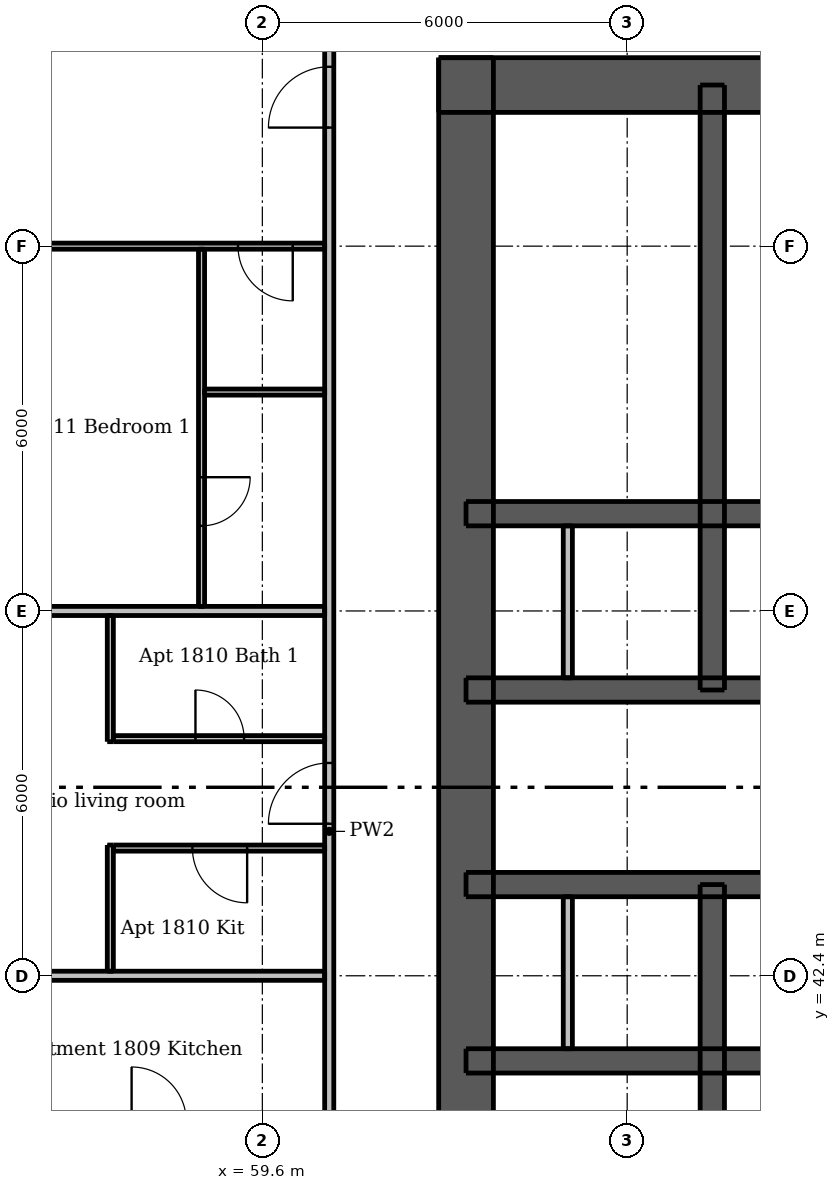
"""IFC4 building model, lengths in metres.
Left out: names, types, materials, properties, quantities, classifications, styles, units other than length and angle.
Written with IfcOpenShell. Run it as: python <this file> out.ifc"""

import sys

from ifc_helpers import new_model, si_unit, direction, frame, frame_2d, origin, place, context, subcontext, project, spatial, rectangle, extrude, element, fill, save


model = new_model("IFC4")
c1 = context("Model", 3, precision=1e-05, world=origin(), true_north=direction((0.0, 1.0)))
c2 = subcontext(c1, "Body", "Model", "MODEL_VIEW")
j1 = project(units=[si_unit("LENGTHUNIT", "METRE"), si_unit("PLANEANGLEUNIT", "RADIAN")], contexts=[c1])
p1 = place(None, origin())
s1 = spatial("IfcSite", under=j1, at=p1, CompositionType="ELEMENT")
p2 = place(p1, origin())
s2 = spatial("IfcBuilding", under=s1, at=p2, CompositionType="ELEMENT")
p3 = place(p2, frame((0.0, 0.0, 66.4)))
s3 = spatial("IfcBuildingStorey", under=s2, at=p3, CompositionType="ELEMENT", Elevation=66.4)
p4 = place(p3, frame((62.5, 57.05, 0.0), z_axis=(0.0, 0.0, 1.0), x_axis=(1.0, 0.0, 0.0)))
e1 = element("IfcWall", 1, at=p4, inside=s3, PredefinedType="SHEAR", context=c2, shape_type="SweptSolid", body=[
    extrude(rectangle(XDim=24.0, YDim=0.9, at=frame_2d((12.0, 0.0))), origin(), (0.0, 0.0, 1.0), 2.95),
])
p5 = place(p4, frame((20.85, 0.0, 0.0)))
e2 = element("IfcOpeningElement", 2, at=p5, cuts=e1, PredefinedType="OPENING", context=c2, shape_type="SweptSolid", body=[
    extrude(rectangle(XDim=1.1, YDim=2.1, at=frame_2d((0.55, 1.05))), frame((0.0, 0.46, 0.0), z_axis=(0.0, -1.0, 0.0), x_axis=(1.0, 0.0, 0.0)), (0.0, 0.0, 1.0), 0.92),
])
p6 = place(p4, frame((2.05, 0.0, 0.0)))
e3 = element("IfcOpeningElement", 3, at=p6, cuts=e1, PredefinedType="OPENING", context=c2, shape_type="SweptSolid", body=[
    extrude(rectangle(XDim=1.1, YDim=2.1, at=frame_2d((0.55, 1.05))), frame((0.0, 0.46, 0.0), z_axis=(0.0, -1.0, 0.0), x_axis=(1.0, 0.0, 0.0)), (0.0, 0.0, 1.0), 0.92),
])
p7 = place(p4, frame((6.44, 0.0, 0.0)))
e4 = element("IfcOpeningElement", 4, at=p7, cuts=e1, PredefinedType="OPENING", context=c2, shape_type="SweptSolid", body=[
    extrude(rectangle(XDim=0.9, YDim=2.1, at=frame_2d((0.45, 1.05))), frame((0.0, 0.46, 0.0), z_axis=(0.0, -1.0, 0.0), x_axis=(1.0, 0.0, 0.0)), (0.0, 0.0, 1.0), 0.92),
])
p8 = place(p4, frame((13.74, 0.0, 0.0)))
e5 = element("IfcOpeningElement", 5, at=p8, cuts=e1, PredefinedType="OPENING", context=c2, shape_type="SweptSolid", body=[
    extrude(rectangle(XDim=0.9, YDim=2.1, at=frame_2d((0.45, 1.05))), frame((0.0, 0.46, 0.0), z_axis=(0.0, -1.0, 0.0), x_axis=(1.0, 0.0, 0.0)), (0.0, 0.0, 1.0), 0.92),
])
p9 = place(p3, frame((62.95, 33.5, 0.0), z_axis=(0.0, 0.0, 1.0), x_axis=(0.0, 1.0, 0.0)))
e6 = element("IfcWall", 6, at=p9, inside=s3, PredefinedType="SHEAR", context=c2, shape_type="SweptSolid", body=[
    extrude(rectangle(XDim=24.0, YDim=0.9, at=frame_2d((12.0, 0.0))), origin(), (0.0, 0.0, 1.0), 2.95),
])
p10 = place(p9, frame((11.2, 0.0, 0.0)))
e7 = element("IfcOpeningElement", 7, at=p10, cuts=e6, PredefinedType="OPENING", context=c2, shape_type="SweptSolid", body=[
    extrude(rectangle(XDim=1.6, YDim=2.1, at=frame_2d((0.8, 1.05))), frame((0.0, 0.46, 0.0), z_axis=(0.0, -1.0, 0.0), x_axis=(1.0, 0.0, 0.0)), (0.0, 0.0, 1.0), 0.92),
])
p11 = place(p3, frame((62.95, 41.0, 0.0), z_axis=(0.0, 0.0, 1.0), x_axis=(1.0, 0.0, 0.0)))
e8 = element("IfcWall", 8, at=p11, inside=s3, PredefinedType="SHEAR", context=c2, shape_type="SweptSolid", body=[
    extrude(rectangle(XDim=23.1, YDim=0.4, at=frame_2d((11.55, 0.0))), origin(), (0.0, 0.0, 1.0), 2.95),
])
p12 = place(p3, frame((62.95, 43.9, 0.0), z_axis=(0.0, 0.0, 1.0), x_axis=(1.0, 0.0, 0.0)))
e9 = element("IfcWall", 9, at=p12, inside=s3, PredefinedType="SHEAR", context=c2, shape_type="SweptSolid", body=[
    extrude(rectangle(XDim=23.1, YDim=0.4, at=frame_2d((11.55, 0.0))), origin(), (0.0, 0.0, 1.0), 2.95),
])
p13 = place(p12, frame((0.662, 0.0, 0.0)))
e10 = element("IfcOpeningElement", 10, at=p13, cuts=e9, PredefinedType="OPENING", context=c2, shape_type="SweptSolid", body=[
    extrude(rectangle(XDim=0.8, YDim=2.1, at=frame_2d((0.4, 1.05))), frame((0.0, 0.21, 0.0), z_axis=(0.0, -1.0, 0.0), x_axis=(1.0, 0.0, 0.0)), (0.0, 0.0, 1.0), 0.42),
])
p14 = place(p12, frame((2.312, 0.0, 0.0)))
e11 = element("IfcOpeningElement", 11, at=p14, cuts=e9, PredefinedType="OPENING", context=c2, shape_type="SweptSolid", body=[
    extrude(rectangle(XDim=0.9, YDim=2.1, at=frame_2d((0.45, 1.05))), frame((0.0, 0.21, 0.0), z_axis=(0.0, -1.0, 0.0), x_axis=(1.0, 0.0, 0.0)), (0.0, 0.0, 1.0), 0.42),
])
p15 = place(p12, frame((20.5, 0.0, 0.0)))
e12 = element("IfcOpeningElement", 12, at=p15, cuts=e9, PredefinedType="OPENING", context=c2, shape_type="SweptSolid", body=[
    extrude(rectangle(XDim=0.9, YDim=2.1, at=frame_2d((0.45, 1.05))), frame((0.0, 0.21, 0.0), z_axis=(0.0, -1.0, 0.0), x_axis=(1.0, 0.0, 0.0)), (0.0, 0.0, 1.0), 0.42),
])
p16 = place(p12, frame((4.75, 0.0, 0.0)))
e13 = element("IfcOpeningElement", 13, at=p16, cuts=e9, PredefinedType="OPENING", context=c2, shape_type="SweptSolid", body=[
    extrude(rectangle(XDim=1.1, YDim=2.1, at=frame_2d((0.55, 1.05))), frame((0.0, 0.21, 0.0), z_axis=(0.0, -1.0, 0.0), x_axis=(1.0, 0.0, 0.0)), (0.0, 0.0, 1.0), 0.42),
])
p17 = place(p12, frame((7.25, 0.0, 0.0)))
e14 = element("IfcOpeningElement", 14, at=p17, cuts=e9, PredefinedType="OPENING", context=c2, shape_type="SweptSolid", body=[
    extrude(rectangle(XDim=1.1, YDim=2.1, at=frame_2d((0.55, 1.05))), frame((0.0, 0.21, 0.0), z_axis=(0.0, -1.0, 0.0), x_axis=(1.0, 0.0, 0.0)), (0.0, 0.0, 1.0), 0.42),
])
p18 = place(p12, frame((9.75, 0.0, 0.0)))
e15 = element("IfcOpeningElement", 15, at=p18, cuts=e9, PredefinedType="OPENING", context=c2, shape_type="SweptSolid", body=[
    extrude(rectangle(XDim=1.1, YDim=2.1, at=frame_2d((0.55, 1.05))), frame((0.0, 0.21, 0.0), z_axis=(0.0, -1.0, 0.0), x_axis=(1.0, 0.0, 0.0)), (0.0, 0.0, 1.0), 0.42),
])
p19 = place(p12, frame((12.25, 0.0, 0.0)))
e16 = element("IfcOpeningElement", 16, at=p19, cuts=e9, PredefinedType="OPENING", context=c2, shape_type="SweptSolid", body=[
    extrude(rectangle(XDim=1.1, YDim=2.1, at=frame_2d((0.55, 1.05))), frame((0.0, 0.21, 0.0), z_axis=(0.0, -1.0, 0.0), x_axis=(1.0, 0.0, 0.0)), (0.0, 0.0, 1.0), 0.42),
])
p20 = place(p12, frame((14.75, 0.0, 0.0)))
e17 = element("IfcOpeningElement", 17, at=p20, cuts=e9, PredefinedType="OPENING", context=c2, shape_type="SweptSolid", body=[
    extrude(rectangle(XDim=1.1, YDim=2.1, at=frame_2d((0.55, 1.05))), frame((0.0, 0.21, 0.0), z_axis=(0.0, -1.0, 0.0), x_axis=(1.0, 0.0, 0.0)), (0.0, 0.0, 1.0), 0.42),
])
p21 = place(p12, frame((17.25, 0.0, 0.0)))
e18 = element("IfcOpeningElement", 18, at=p21, cuts=e9, PredefinedType="OPENING", context=c2, shape_type="SweptSolid", body=[
    extrude(rectangle(XDim=1.1, YDim=2.1, at=frame_2d((0.55, 1.05))), frame((0.0, 0.21, 0.0), z_axis=(0.0, -1.0, 0.0), x_axis=(1.0, 0.0, 0.0)), (0.0, 0.0, 1.0), 0.42),
])
p22 = place(p3, frame((62.95, 47.1, 0.0), z_axis=(0.0, 0.0, 1.0), x_axis=(1.0, 0.0, 0.0)))
e19 = element("IfcWall", 19, at=p22, inside=s3, PredefinedType="SHEAR", context=c2, shape_type="SweptSolid", body=[
    extrude(rectangle(XDim=23.1, YDim=0.4, at=frame_2d((11.55, 0.0))), origin(), (0.0, 0.0, 1.0), 2.95),
])
p23 = place(p22, frame((0.662, 0.0, 0.0)))
e20 = element("IfcOpeningElement", 20, at=p23, cuts=e19, PredefinedType="OPENING", context=c2, shape_type="SweptSolid", body=[
    extrude(rectangle(XDim=0.8, YDim=2.1, at=frame_2d((0.4, 1.05))), frame((0.0, 0.21, 0.0), z_axis=(0.0, -1.0, 0.0), x_axis=(1.0, 0.0, 0.0)), (0.0, 0.0, 1.0), 0.42),
])
p24 = place(p22, frame((2.312, 0.0, 0.0)))
e21 = element("IfcOpeningElement", 21, at=p24, cuts=e19, PredefinedType="OPENING", context=c2, shape_type="SweptSolid", body=[
    extrude(rectangle(XDim=0.9, YDim=2.1, at=frame_2d((0.45, 1.05))), frame((0.0, 0.21, 0.0), z_axis=(0.0, -1.0, 0.0), x_axis=(1.0, 0.0, 0.0)), (0.0, 0.0, 1.0), 0.42),
])
p25 = place(p22, frame((20.5, 0.0, 0.0)))
e22 = element("IfcOpeningElement", 22, at=p25, cuts=e19, PredefinedType="OPENING", context=c2, shape_type="SweptSolid", body=[
    extrude(rectangle(XDim=0.9, YDim=2.1, at=frame_2d((0.45, 1.05))), frame((0.0, 0.21, 0.0), z_axis=(0.0, -1.0, 0.0), x_axis=(1.0, 0.0, 0.0)), (0.0, 0.0, 1.0), 0.42),
])
p26 = place(p3, frame((62.95, 50.0, 0.0), z_axis=(0.0, 0.0, 1.0), x_axis=(1.0, 0.0, 0.0)))
e23 = element("IfcWall", 23, at=p26, inside=s3, PredefinedType="SHEAR", context=c2, shape_type="SweptSolid", body=[
    extrude(rectangle(XDim=23.1, YDim=0.4, at=frame_2d((11.55, 0.0))), origin(), (0.0, 0.0, 1.0), 2.95),
])
p27 = place(p3, frame((67.0, 33.95, 0.0), z_axis=(0.0, 0.0, 1.0), x_axis=(0.0, 1.0, 0.0)))
e24 = element("IfcWall", 24, at=p27, inside=s3, PredefinedType="SHEAR", context=c2, shape_type="SweptSolid", body=[
    extrude(rectangle(XDim=9.95, YDim=0.4, at=frame_2d((4.975, 0.0))), origin(), (0.0, 0.0, 1.0), 2.95),
])
p28 = place(p27, frame((0.65, 0.0, 0.0)))
e25 = element("IfcOpeningElement", 25, at=p28, cuts=e24, PredefinedType="OPENING", context=c2, shape_type="SweptSolid", body=[
    extrude(rectangle(XDim=1.1, YDim=2.1, at=frame_2d((0.55, 1.05))), frame((0.0, 0.21, 0.0), z_axis=(0.0, -1.0, 0.0), x_axis=(1.0, 0.0, 0.0)), (0.0, 0.0, 1.0), 0.42),
])
p29 = place(p3, frame((67.0, 47.1, 0.0), z_axis=(0.0, 0.0, 1.0), x_axis=(0.0, 1.0, 0.0)))
e26 = element("IfcWall", 26, at=p29, inside=s3, PredefinedType="SHEAR", context=c2, shape_type="SweptSolid", body=[
    extrude(rectangle(XDim=9.95, YDim=0.4, at=frame_2d((4.975, 0.0))), origin(), (0.0, 0.0, 1.0), 2.95),
])
for number, where, z_axis, x_axis in (
    (27, (64.624, 41.2, 0.0), (0.0, 0.0, 1.0), (0.0, 1.0, 0.0)),
    (28, (64.624, 47.3, 0.0), (0.0, 0.0, 1.0), (0.0, 1.0, 0.0)),
):
    element("IfcWall", number, at=place(p3, frame(where, z_axis=z_axis, x_axis=x_axis)), inside=s3, PredefinedType="PLUMBINGWALL", context=c2, shape_type="SweptSolid", body=[
        extrude(rectangle(XDim=2.5, YDim=0.15, at=frame_2d((1.25, 0.0))), origin(), (0.0, 0.0, 1.0), 2.95),
    ])
for number, where, z_axis, x_axis in (
    (29, (57.1, 42.475, 0.0), (0.0, 0.0, 1.0), (0.0, 1.0, 0.0)),
    (30, (57.1, 46.25, 0.0), (0.0, 0.0, 1.0), (0.0, 1.0, 0.0)),
):
    element("IfcWall", number, at=place(p3, frame(where, z_axis=z_axis, x_axis=x_axis)), inside=s3, PredefinedType="PARTITIONING", context=c2, shape_type="SweptSolid", body=[
        extrude(rectangle(XDim=2.075, YDim=0.1, at=frame_2d((1.038, 0.0))), origin(), (0.0, 0.0, 1.0), 2.95),
    ])
p30 = place(p3, frame((58.6, 54.35, 0.0), z_axis=(0.0, 0.0, 1.0), x_axis=(0.0, -1.0, 0.0)))
e31 = element("IfcWall", 31, at=p30, inside=s3, PredefinedType="PARTITIONING", context=c2, shape_type="SweptSolid", body=[
    extrude(rectangle(XDim=5.875, YDim=0.1, at=frame_2d((2.938, 0.0))), origin(), (0.0, 0.0, 1.0), 2.95),
])
p31 = place(p30, frame((3.75, 0.0, 0.0)))
e32 = element("IfcOpeningElement", 32, at=p31, cuts=e31, PredefinedType="OPENING", context=c2, shape_type="SweptSolid", body=[
    extrude(rectangle(XDim=0.8, YDim=2.1, at=frame_2d((0.4, 1.05))), frame((0.0, 0.06, 0.0), z_axis=(0.0, -1.0, 0.0), x_axis=(1.0, 0.0, 0.0)), (0.0, 0.0, 1.0), 0.12),
])
p32 = place(p3, frame((60.625, 54.4, 0.0), z_axis=(0.0, 0.0, 1.0), x_axis=(-1.0, 0.0, 0.0)))
e33 = element("IfcWall", 33, at=p32, inside=s3, PredefinedType="PARTITIONING", context=c2, shape_type="SweptSolid", body=[
    extrude(rectangle(XDim=8.625, YDim=0.1, at=frame_2d((4.312, 0.0))), origin(), (0.0, 0.0, 1.0), 2.332),
])
p33 = place(p32, frame((0.525, 0.0, 0.0)))
e34 = element("IfcOpeningElement", 34, at=p33, cuts=e33, PredefinedType="OPENING", context=c2, shape_type="SweptSolid", body=[
    extrude(rectangle(XDim=0.9, YDim=2.1, at=frame_2d((0.45, 1.05))), frame((0.0, 0.06, 0.0), z_axis=(0.0, -1.0, 0.0), x_axis=(1.0, 0.0, 0.0)), (0.0, 0.0, 1.0), 0.12),
])
p34 = place(p32, frame((4.875, 0.0, 0.0)))
e35 = element("IfcOpeningElement", 35, at=p34, cuts=e33, PredefinedType="OPENING", context=c2, shape_type="SweptSolid", body=[
    extrude(rectangle(XDim=0.9, YDim=2.1, at=frame_2d((0.45, 1.05))), frame((0.0, 0.06, 0.0), z_axis=(0.0, -1.0, 0.0), x_axis=(1.0, 0.0, 0.0)), (0.0, 0.0, 1.0), 0.12),
])
p35 = place(p3, frame((58.65, 52.0, 0.0), z_axis=(0.0, 0.0, 1.0), x_axis=(1.0, 0.0, 0.0)))
e36 = element("IfcWall", 36, at=p35, inside=s3, PredefinedType="PARTITIONING", context=c2, shape_type="SweptSolid", body=[
    extrude(rectangle(XDim=1.975, YDim=0.1, at=frame_2d((0.988, 0.0))), origin(), (0.0, 0.0, 1.0), 2.95),
])
p36 = place(p3, frame((57.15, 46.3, 0.0), z_axis=(0.0, 0.0, 1.0), x_axis=(1.0, 0.0, 0.0)))
e37 = element("IfcWall", 37, at=p36, inside=s3, PredefinedType="PARTITIONING", context=c2, shape_type="SweptSolid", body=[
    extrude(rectangle(XDim=3.475, YDim=0.1, at=frame_2d((1.738, 0.0))), origin(), (0.0, 0.0, 1.0), 2.95),
])
p37 = place(p36, frame((1.35, 0.0, 0.0)))
e38 = element("IfcOpeningElement", 38, at=p37, cuts=e37, PredefinedType="OPENING", context=c2, shape_type="SweptSolid", body=[
    extrude(rectangle(XDim=0.8, YDim=2.1, at=frame_2d((0.4, 1.05))), frame((0.0, 0.06, 0.0), z_axis=(0.0, -1.0, 0.0), x_axis=(1.0, 0.0, 0.0)), (0.0, 0.0, 1.0), 0.12),
])
p38 = place(p3, frame((60.625, 44.5, 0.0), z_axis=(0.0, 0.0, 1.0), x_axis=(-1.0, 0.0, 0.0)))
e39 = element("IfcWall", 39, at=p38, inside=s3, PredefinedType="PARTITIONING", context=c2, shape_type="SweptSolid", body=[
    extrude(rectangle(XDim=3.475, YDim=0.1, at=frame_2d((1.738, 0.0))), origin(), (0.0, 0.0, 1.0), 2.95),
])
p39 = place(p38, frame((1.275, 0.0, 0.0)))
e40 = element("IfcOpeningElement", 40, at=p39, cuts=e39, PredefinedType="OPENING", context=c2, shape_type="SweptSolid", body=[
    extrude(rectangle(XDim=0.9, YDim=2.1, at=frame_2d((0.45, 1.05))), frame((0.0, 0.06, 0.0), z_axis=(0.0, -1.0, 0.0), x_axis=(1.0, 0.0, 0.0)), (0.0, 0.0, 1.0), 0.12),
])
p40 = place(p3, frame((60.7, 30.325, 0.0), z_axis=(0.0, 0.0, 1.0), x_axis=(0.0, 1.0, 0.0)))
e41 = element("IfcWall", 41, at=p40, inside=s3, PredefinedType="PARTITIONING", context=c2, shape_type="SweptSolid", body=[
    extrude(rectangle(XDim=28.9, YDim=0.15, at=frame_2d((14.45, 0.0))), origin(), (0.0, 0.0, 1.0), 2.95),
])
p41 = place(p40, frame((7.375, 0.0, 0.0)))
e42 = element("IfcOpeningElement", 42, at=p41, cuts=e41, PredefinedType="OPENING", context=c2, shape_type="SweptSolid", body=[
    extrude(rectangle(XDim=1.0, YDim=2.1, at=frame_2d((0.5, 1.05))), frame((0.0, 0.085, 0.0), z_axis=(0.0, -1.0, 0.0), x_axis=(1.0, 0.0, 0.0)), (0.0, 0.0, 1.0), 0.17),
])
p42 = place(p40, frame((14.575, 0.0, 0.0)))
e43 = element("IfcOpeningElement", 43, at=p42, cuts=e41, PredefinedType="OPENING", context=c2, shape_type="SweptSolid", body=[
    extrude(rectangle(XDim=1.0, YDim=2.1, at=frame_2d((0.5, 1.05))), frame((0.0, 0.085, 0.0), z_axis=(0.0, -1.0, 0.0), x_axis=(1.0, 0.0, 0.0)), (0.0, 0.0, 1.0), 0.17),
])
p43 = place(p40, frame((26.025, 0.0, 0.0)))
e44 = element("IfcOpeningElement", 44, at=p43, cuts=e41, PredefinedType="OPENING", context=c2, shape_type="SweptSolid", body=[
    extrude(rectangle(XDim=1.0, YDim=2.1, at=frame_2d((0.5, 1.05))), frame((0.0, 0.085, 0.0), z_axis=(0.0, -1.0, 0.0), x_axis=(1.0, 0.0, 0.0)), (0.0, 0.0, 1.0), 0.17),
])
for number, where, z_axis, x_axis in (
    (45, (52.0, 48.4, 0.0), (0.0, 0.0, 1.0), (1.0, 0.0, 0.0)),
    (46, (52.0, 42.4, 0.0), (0.0, 0.0, 1.0), (1.0, 0.0, 0.0)),
):
    element("IfcWall", number, at=place(p3, frame(where, z_axis=z_axis, x_axis=x_axis)), inside=s3, PredefinedType="PARTITIONING", context=c2, shape_type="SweptSolid", body=[
        extrude(rectangle(XDim=8.625, YDim=0.15, at=frame_2d((4.312, 0.0))), origin(), (0.0, 0.0, 1.0), 2.332),
    ])
p44 = place(p6, origin())
e47 = element("IfcDoor", 47, at=p44, inside=s3, OperationType="SINGLE_SWING_LEFT", PredefinedType="DOOR", context=c2, shape_type="SweptSolid", body=[
    extrude(rectangle(XDim=1.1, YDim=2.1, at=frame_2d((0.55, 1.05))), frame((0.0, -0.388, 0.0), z_axis=(0.0, -1.0, 0.0), x_axis=(1.0, 0.0, 0.0)), (0.0, 0.0, 1.0), 0.05),
])
fill(e3, e47)
p45 = place(p10, origin())
e48 = element("IfcDoor", 48, at=p45, inside=s3, OperationType="DOUBLE_DOOR_SINGLE_SWING", PredefinedType="DOOR", context=c2, shape_type="SweptSolid", body=[
    extrude(rectangle(XDim=1.6, YDim=2.1, at=frame_2d((0.8, 1.05))), frame((0.0, -0.388, 0.0), z_axis=(0.0, -1.0, 0.0), x_axis=(1.0, 0.0, 0.0)), (0.0, 0.0, 1.0), 0.05),
])
fill(e7, e48)
p46 = place(p13, origin())
e49 = element("IfcDoor", 49, at=p46, inside=s3, OperationType="SINGLE_SWING_LEFT", PredefinedType="DOOR", context=c2, shape_type="SweptSolid", body=[
    extrude(rectangle(XDim=0.8, YDim=2.1, at=frame_2d((0.4, 1.05))), frame((0.0, -0.138, 0.0), z_axis=(0.0, -1.0, 0.0), x_axis=(1.0, 0.0, 0.0)), (0.0, 0.0, 1.0), 0.05),
])
fill(e10, e49)
p47 = place(p14, origin())
e50 = element("IfcDoor", 50, at=p47, inside=s3, OperationType="SINGLE_SWING_RIGHT", PredefinedType="DOOR", context=c2, shape_type="SweptSolid", body=[
    extrude(rectangle(XDim=0.9, YDim=2.1, at=frame_2d((0.45, 1.05))), frame((0.0, -0.138, 0.0), z_axis=(0.0, -1.0, 0.0), x_axis=(1.0, 0.0, 0.0)), (0.0, 0.0, 1.0), 0.05),
])
fill(e11, e50)
p48 = place(p23, origin())
e51 = element("IfcDoor", 51, at=p48, inside=s3, OperationType="SINGLE_SWING_LEFT", PredefinedType="DOOR", context=c2, shape_type="SweptSolid", body=[
    extrude(rectangle(XDim=0.8, YDim=2.1, at=frame_2d((0.4, 1.05))), frame((0.0, 0.188, 0.0), z_axis=(0.0, -1.0, 0.0), x_axis=(1.0, 0.0, 0.0)), (0.0, 0.0, 1.0), 0.05),
])
fill(e20, e51)
p49 = place(p24, origin())
e52 = element("IfcDoor", 52, at=p49, inside=s3, OperationType="SINGLE_SWING_RIGHT", PredefinedType="DOOR", context=c2, shape_type="SweptSolid", body=[
    extrude(rectangle(XDim=0.9, YDim=2.1, at=frame_2d((0.45, 1.05))), frame((0.0, 0.188, 0.0), z_axis=(0.0, -1.0, 0.0), x_axis=(1.0, 0.0, 0.0)), (0.0, 0.0, 1.0), 0.05),
])
fill(e21, e52)
p50 = place(p16, origin())
e53 = element("IfcDoor", 53, at=p50, inside=s3, OperationType="DOUBLE_DOOR_SLIDING", PredefinedType="DOOR", context=c2, shape_type="SweptSolid", body=[
    extrude(rectangle(XDim=1.1, YDim=2.1, at=frame_2d((0.55, 1.05))), frame((0.0, 0.025, 0.0), z_axis=(0.0, -1.0, 0.0), x_axis=(1.0, 0.0, 0.0)), (0.0, 0.0, 1.0), 0.05),
])
fill(e13, e53)
p51 = place(p42, origin())
e54 = element("IfcDoor", 54, at=p51, inside=s3, OperationType="SINGLE_SWING_LEFT", PredefinedType="DOOR", context=c2, shape_type="SweptSolid", body=[
    extrude(rectangle(XDim=1.0, YDim=2.1, at=frame_2d((0.5, 1.05))), frame((0.0, 0.025, 0.0), z_axis=(0.0, -1.0, 0.0), x_axis=(1.0, 0.0, 0.0)), (0.0, 0.0, 1.0), 0.05),
])
fill(e43, e54)
p52 = place(p39, origin())
e55 = element("IfcDoor", 55, at=p52, inside=s3, OperationType="SINGLE_SWING_LEFT", PredefinedType="DOOR", context=c2, shape_type="SweptSolid", body=[
    extrude(rectangle(XDim=0.9, YDim=2.1, at=frame_2d((0.45, 1.05))), frame((0.0, 0.025, 0.0), z_axis=(0.0, -1.0, 0.0), x_axis=(1.0, 0.0, 0.0)), (0.0, 0.0, 1.0), 0.05),
])
fill(e40, e55)
p53 = place(p37, origin())
e56 = element("IfcDoor", 56, at=p53, inside=s3, OperationType="SINGLE_SWING_LEFT", PredefinedType="DOOR", context=c2, shape_type="SweptSolid", body=[
    extrude(rectangle(XDim=0.8, YDim=2.1, at=frame_2d((0.4, 1.05))), frame((0.0, 0.025, 0.0), z_axis=(0.0, -1.0, 0.0), x_axis=(1.0, 0.0, 0.0)), (0.0, 0.0, 1.0), 0.05),
])
fill(e38, e56)
p54 = place(p43, origin())
e57 = element("IfcDoor", 57, at=p54, inside=s3, OperationType="SINGLE_SWING_LEFT", PredefinedType="DOOR", context=c2, shape_type="SweptSolid", body=[
    extrude(rectangle(XDim=1.0, YDim=2.1, at=frame_2d((0.5, 1.05))), frame((0.0, 0.025, 0.0), z_axis=(0.0, -1.0, 0.0), x_axis=(1.0, 0.0, 0.0)), (0.0, 0.0, 1.0), 0.05),
])
fill(e44, e57)
p55 = place(p33, origin())
e58 = element("IfcDoor", 58, at=p55, inside=s3, OperationType="SINGLE_SWING_LEFT", PredefinedType="DOOR", context=c2, shape_type="SweptSolid", body=[
    extrude(rectangle(XDim=0.9, YDim=2.1, at=frame_2d((0.45, 1.05))), frame((0.0, 0.025, 0.0), z_axis=(0.0, -1.0, 0.0), x_axis=(1.0, 0.0, 0.0)), (0.0, 0.0, 1.0), 0.05),
])
fill(e34, e58)
p56 = place(p31, origin())
e59 = element("IfcDoor", 59, at=p56, inside=s3, OperationType="SINGLE_SWING_LEFT", PredefinedType="DOOR", context=c2, shape_type="SweptSolid", body=[
    extrude(rectangle(XDim=0.8, YDim=2.1, at=frame_2d((0.4, 1.05))), frame((0.0, 0.025, 0.0), z_axis=(0.0, -1.0, 0.0), x_axis=(1.0, 0.0, 0.0)), (0.0, 0.0, 1.0), 0.05),
])
fill(e32, e59)
save(model, sys.argv[1])
